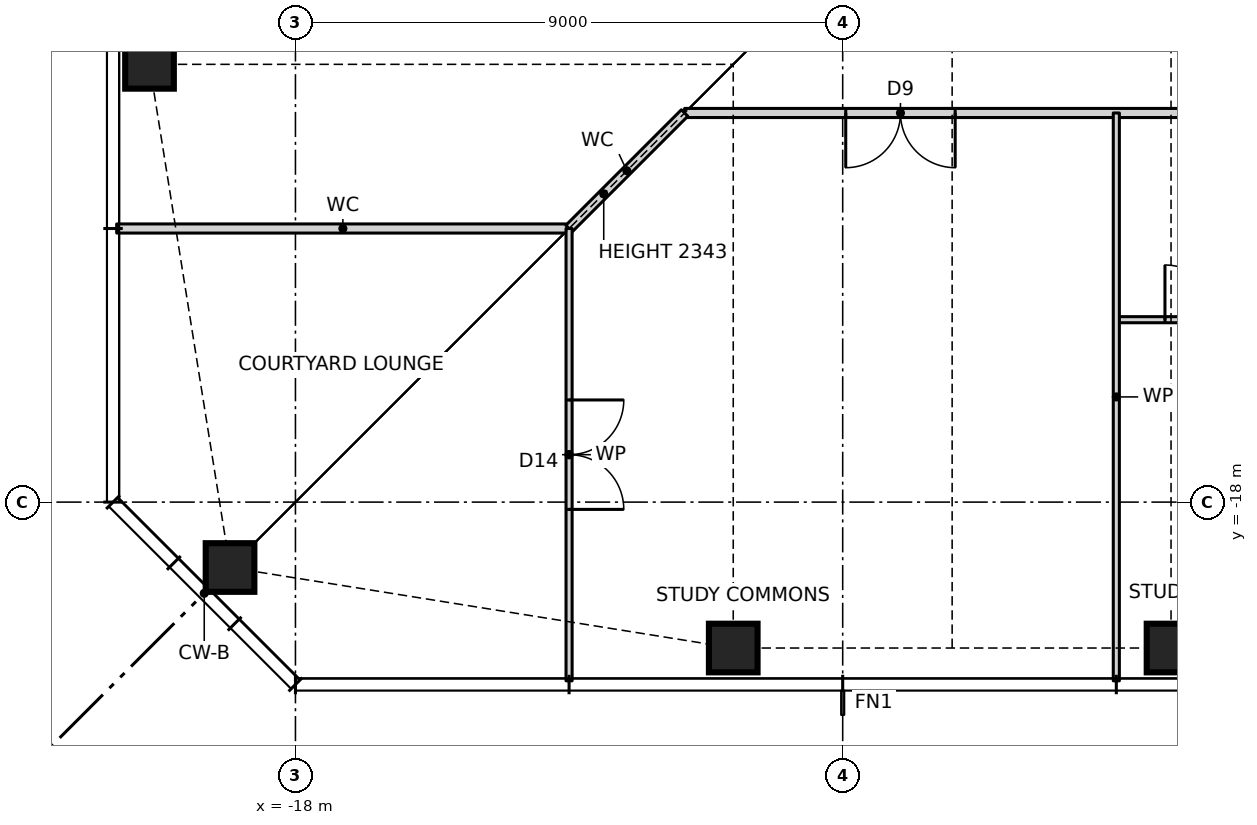
"""IFC4 building model, lengths in metres.
Left out: names, types, materials, properties, quantities, classifications, styles, units other than length and angle.
Written with IfcOpenShell. Run it as: python <this file> out.ifc"""

import sys

from ifc_helpers import new_model, si_unit, direction, frame, frame_2d, origin, origin_2d, place, context, subcontext, project, spatial, rectangle, hollow_rectangle, extrude, element, fill, save


model = new_model("IFC4")
c1 = context("Model", 3, precision=1e-05, world=origin(), true_north=direction((0.0, 1.0)))
c2 = subcontext(c1, "Body", "Model", "MODEL_VIEW")
j1 = project(units=[si_unit("LENGTHUNIT", "METRE"), si_unit("PLANEANGLEUNIT", "RADIAN")], contexts=[c1])
p1 = place(None, origin())
s1 = spatial("IfcSite", under=j1, at=p1, CompositionType="ELEMENT")
p2 = place(p1, origin())
s2 = spatial("IfcBuilding", under=s1, at=p2, CompositionType="ELEMENT")
p3 = place(p2, frame((0.0, 0.0, 136.5)))
s3 = spatial("IfcBuildingStorey", under=s2, at=p3, CompositionType="ELEMENT", Elevation=136.5)
for number, where, z_axis, x_axis in (
    (1, (-19.076, -19.076, 0.0), (0.0, 0.0, 1.0), (1.0, 0.0, 0.0)),
    (2, (-10.8, -20.4, 0.0), (0.0, 0.0, 1.0), (1.0, 0.0, 0.0)),
    (3, (-3.6, -20.4, 0.0), (0.0, 0.0, 1.0), (1.0, 0.0, 0.0)),
    (4, (-20.4, -10.8, 0.0), (0.0, 0.0, 1.0), (1.0, 0.0, 0.0)),
):
    element("IfcColumn", number, at=place(p3, frame(where, z_axis=z_axis, x_axis=x_axis)), inside=s3, PredefinedType="COLUMN", context=c2, shape_type="SweptSolid", body=[
        extrude(hollow_rectangle(XDim=0.8, YDim=0.8, WallThickness=0.07, at=origin_2d()), origin(), (0.0, 0.0, 1.0), 3.5),
    ])
p4 = place(p3, frame((-4.5, -15.0, 0.0), z_axis=(0.0, 0.0, 1.0), x_axis=(1.0, 0.0, 0.0)))
e5 = element("IfcWall", 5, at=p4, inside=s3, PredefinedType="PARTITIONING", context=c2, shape_type="SweptSolid", body=[
    extrude(rectangle(XDim=13.5, YDim=0.1, at=frame_2d((6.75, 0.0))), origin(), (0.0, 0.0, 1.0), 3.27),
])
p5 = place(p4, frame((0.8, 0.0, 0.0)))
e6 = element("IfcOpeningElement", 6, at=p5, cuts=e5, PredefinedType="OPENING", context=c2, shape_type="SweptSolid", body=[
    extrude(rectangle(XDim=0.9, YDim=2.1, at=frame_2d((0.45, 1.05))), frame((0.0, 0.06, 0.0), z_axis=(0.0, -1.0, 0.0), x_axis=(1.0, 0.0, 0.0)), (0.0, 0.0, 1.0), 0.12),
])
p6 = place(p4, frame((7.3, 0.0, 0.0)))
e7 = element("IfcOpeningElement", 7, at=p6, cuts=e5, PredefinedType="OPENING", context=c2, shape_type="SweptSolid", body=[
    extrude(rectangle(XDim=0.9, YDim=2.1, at=frame_2d((0.45, 1.05))), frame((0.0, 0.06, 0.0), z_axis=(0.0, -1.0, 0.0), x_axis=(1.0, 0.0, 0.0)), (0.0, 0.0, 1.0), 0.12),
])
p7 = place(p4, frame((9.8, 0.0, 0.0)))
e8 = element("IfcOpeningElement", 8, at=p7, cuts=e5, PredefinedType="OPENING", context=c2, shape_type="SweptSolid", body=[
    extrude(rectangle(XDim=0.9, YDim=2.1, at=frame_2d((0.45, 1.05))), frame((0.0, 0.06, 0.0), z_axis=(0.0, -1.0, 0.0), x_axis=(1.0, 0.0, 0.0)), (0.0, 0.0, 1.0), 0.12),
])
p8 = place(p3, frame((-20.94, -13.5, 0.0), z_axis=(0.0, 0.0, 1.0), x_axis=(1.0, 0.0, 0.0)))
e9 = element("IfcWall", 9, at=p8, inside=s3, PredefinedType="PARTITIONING", context=c2, shape_type="SweptSolid", body=[
    extrude(rectangle(XDim=7.44, YDim=0.15, at=frame_2d((3.72, 0.0))), origin(), (0.0, 0.0, 1.0), 3.27),
])
p9 = place(p3, frame((-11.6, -11.6, 0.0), z_axis=(0.0, 0.0, 1.0), x_axis=(1.0, 0.0, 0.0)))
e10 = element("IfcWall", 10, at=p9, inside=s3, PredefinedType="PARTITIONING", context=c2, shape_type="SweptSolid", body=[
    extrude(rectangle(XDim=20.6, YDim=0.15, at=frame_2d((10.3, 0.0))), origin(), (0.0, 0.0, 1.0), 3.27),
])
p10 = place(p9, frame((2.65, 0.0, 0.0)))
e11 = element("IfcOpeningElement", 11, at=p10, cuts=e10, PredefinedType="OPENING", context=c2, shape_type="SweptSolid", body=[
    extrude(rectangle(XDim=1.8, YDim=2.1, at=frame_2d((0.9, 1.05))), frame((0.0, 0.085, 0.0), z_axis=(0.0, -1.0, 0.0), x_axis=(1.0, 0.0, 0.0)), (0.0, 0.0, 1.0), 0.17),
])
p11 = place(p9, frame((8.35, 0.0, 0.0)))
e12 = element("IfcOpeningElement", 12, at=p11, cuts=e10, PredefinedType="OPENING", context=c2, shape_type="SweptSolid", body=[
    extrude(rectangle(XDim=1.0, YDim=2.1, at=frame_2d((0.5, 1.05))), frame((0.0, 0.085, 0.0), z_axis=(0.0, -1.0, 0.0), x_axis=(1.0, 0.0, 0.0)), (0.0, 0.0, 1.0), 0.17),
])
p12 = place(p3, frame((-13.5, -13.5, 0.0), z_axis=(0.0, 0.0, 1.0), x_axis=(0.707106781187, 0.707106781187, 0.0)))
e13 = element("IfcWall", 13, at=p12, inside=s3, PredefinedType="PARTITIONING", context=c2, shape_type="SweptSolid", body=[
    extrude(rectangle(XDim=2.687, YDim=0.15, at=frame_2d((1.343, 0.0))), origin(), (0.0, 0.0, 1.0), 2.343),
])
p13 = place(p3, frame((-4.5, -20.94, 0.0), z_axis=(0.0, 0.0, 1.0), x_axis=(0.0, 1.0, 0.0)))
e14 = element("IfcWall", 14, at=p13, inside=s3, PredefinedType="PARTITIONING", context=c2, shape_type="SweptSolid", body=[
    extrude(rectangle(XDim=9.34, YDim=0.1, at=frame_2d((4.67, 0.0))), origin(), (0.0, 0.0, 1.0), 3.27),
])
p14 = place(p3, frame((-13.5, -20.94, 0.0), z_axis=(0.0, 0.0, 1.0), x_axis=(0.0, 1.0, 0.0)))
e15 = element("IfcWall", 15, at=p14, inside=s3, PredefinedType="PARTITIONING", context=c2, shape_type="SweptSolid", body=[
    extrude(rectangle(XDim=7.44, YDim=0.1, at=frame_2d((3.72, 0.0))), origin(), (0.0, 0.0, 1.0), 3.27),
])
p15 = place(p14, frame((2.82, 0.0, 0.0)))
e16 = element("IfcOpeningElement", 16, at=p15, cuts=e15, PredefinedType="OPENING", context=c2, shape_type="SweptSolid", body=[
    extrude(rectangle(XDim=1.8, YDim=2.1, at=frame_2d((0.9, 1.05))), frame((0.0, 0.06, 0.0), z_axis=(0.0, -1.0, 0.0), x_axis=(1.0, 0.0, 0.0)), (0.0, 0.0, 1.0), 0.12),
])
p16 = place(p10, frame((1.8, 0.0, 0.0), z_axis=(0.0, 0.0, 1.0), x_axis=(-1.0, 0.0, 0.0)))
e17 = element("IfcDoor", 17, at=p16, inside=s3, OperationType="DOUBLE_DOOR_SINGLE_SWING", PredefinedType="DOOR", context=c2, shape_type="SweptSolid", body=[
    extrude(rectangle(XDim=1.8, YDim=2.1, at=frame_2d((0.9, 1.05))), frame((0.0, 0.025, 0.0), z_axis=(0.0, -1.0, 0.0), x_axis=(1.0, 0.0, 0.0)), (0.0, 0.0, 1.0), 0.05),
])
fill(e11, e17)
p17 = place(p5, origin())
e18 = element("IfcDoor", 18, at=p17, inside=s3, OperationType="SINGLE_SWING_LEFT", PredefinedType="DOOR", context=c2, shape_type="SweptSolid", body=[
    extrude(rectangle(XDim=0.9, YDim=2.1, at=frame_2d((0.45, 1.05))), frame((0.0, 0.025, 0.0), z_axis=(0.0, -1.0, 0.0), x_axis=(1.0, 0.0, 0.0)), (0.0, 0.0, 1.0), 0.05),
])
fill(e6, e18)
p18 = place(p15, frame((1.8, 0.0, 0.0), z_axis=(0.0, 0.0, 1.0), x_axis=(-1.0, 0.0, 0.0)))
e19 = element("IfcDoor", 19, at=p18, inside=s3, OperationType="DOUBLE_DOOR_SINGLE_SWING", PredefinedType="DOOR", context=c2, shape_type="SweptSolid", body=[
    extrude(rectangle(XDim=1.8, YDim=2.1, at=frame_2d((0.9, 1.05))), frame((0.0, 0.025, 0.0), z_axis=(0.0, -1.0, 0.0), x_axis=(1.0, 0.0, 0.0)), (0.0, 0.0, 1.0), 0.05),
])
fill(e16, e19)
save(model, sys.argv[1])
